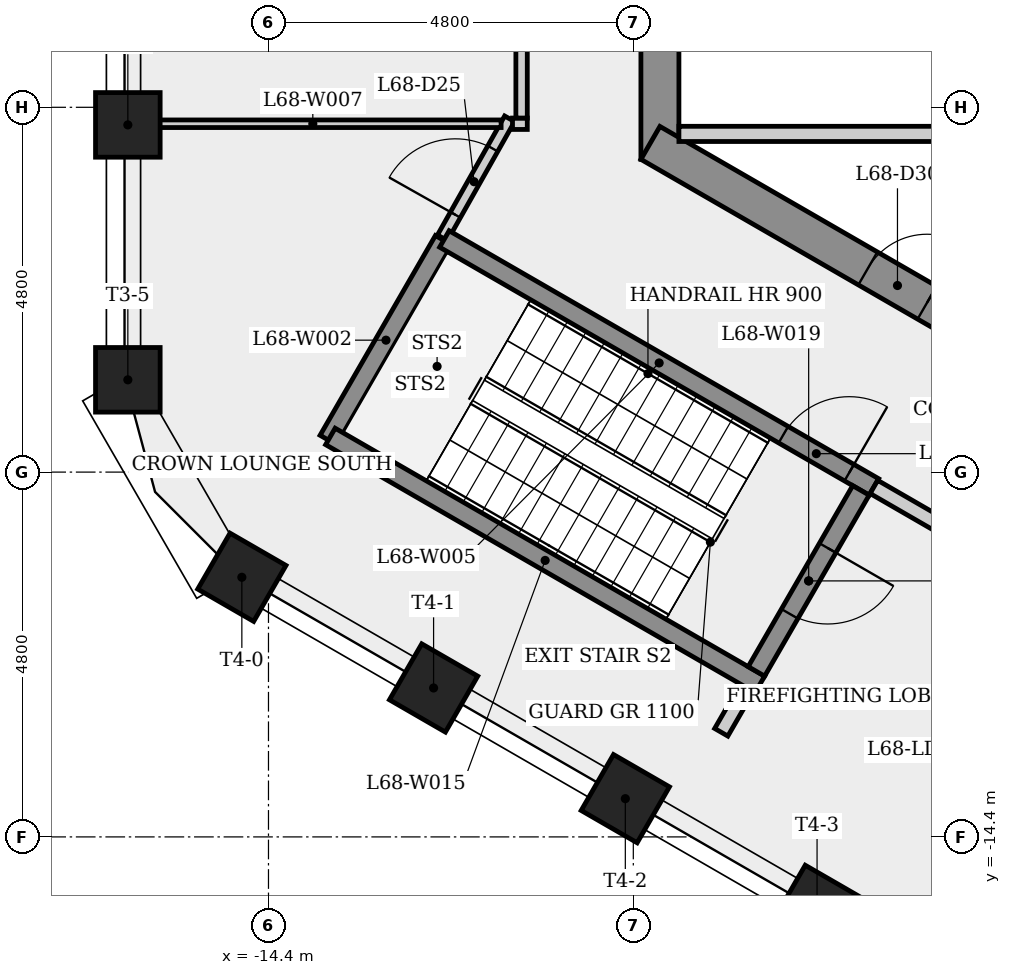
"""IFC4 building model, lengths in metres.
Left out: names, types, materials, properties, quantities, classifications, styles, units other than length and angle.
Written with IfcOpenShell. Run it as: python <this file> out.ifc"""

import sys

from ifc_helpers import new_model, si_unit, direction, frame, frame_2d, origin, origin_2d, place, context, subcontext, project, spatial, rectangle, extrude, element, fill, save


model = new_model("IFC4")
c1 = context("Model", 3, precision=1e-05, world=origin(), true_north=direction((0.0, 1.0)))
c2 = subcontext(c1, "Body", "Model", "MODEL_VIEW")
j1 = project(units=[si_unit("LENGTHUNIT", "METRE"), si_unit("PLANEANGLEUNIT", "RADIAN")], contexts=[c1])
p1 = place(None, origin())
s1 = spatial("IfcSite", under=j1, at=p1, CompositionType="ELEMENT")
p2 = place(p1, origin())
s2 = spatial("IfcBuilding", under=s1, at=p2, CompositionType="ELEMENT")
p3 = place(p2, frame((0.0, 0.0, 252.9)))
s3 = spatial("IfcBuildingStorey", under=s2, at=p3, CompositionType="ELEMENT", Elevation=252.9)
p4 = place(p3, frame((-9.25, 5.485, 0.0), z_axis=(0.0, 0.0, 1.0), x_axis=(0.0, -1.0, 0.0)))
e1 = element("IfcWall", 1, at=p4, inside=s3, PredefinedType="SHEAR", context=c2, shape_type="SweptSolid", body=[
    extrude(rectangle(XDim=10.97, YDim=0.5, at=frame_2d((5.485, 0.0))), origin(), (0.0, 0.0, 1.0), 5.0),
])
p5 = place(p4, frame((8.51, 0.0, 0.0)))
e2 = element("IfcOpeningElement", 2, at=p5, cuts=e1, PredefinedType="OPENING", context=c2, shape_type="SweptSolid", body=[
    extrude(rectangle(XDim=0.9, YDim=2.1, at=frame_2d((0.45, 1.05))), frame((0.0, 0.26, 0.0), z_axis=(0.0, -1.0, 0.0), x_axis=(1.0, 0.0, 0.0)), (0.0, 0.0, 1.0), 0.52),
])
p6 = place(p4, frame((4.685, 0.0, 0.0)))
e3 = element("IfcOpeningElement", 3, at=p6, cuts=e1, PredefinedType="OPENING", context=c2, shape_type="SweptSolid", body=[
    extrude(rectangle(XDim=1.6, YDim=2.1, at=frame_2d((0.8, 1.05))), frame((0.0, 0.26, 0.0), z_axis=(0.0, -1.0, 0.0), x_axis=(1.0, 0.0, 0.0)), (0.0, 0.0, 1.0), 0.52),
])
p7 = place(p3, frame((-9.375, -5.268, 0.0), z_axis=(0.0, 0.0, 1.0), x_axis=(0.866023993627, -0.500002442456, 0.0)))
e4 = element("IfcWall", 4, at=p7, inside=s3, PredefinedType="SHEAR", context=c2, shape_type="SweptSolid", body=[
    extrude(rectangle(XDim=10.97, YDim=0.5, at=frame_2d((5.485, 0.0))), origin(), (0.0, 0.0, 1.0), 5.0),
])
p8 = place(p7, frame((3.303, 0.0, 0.0)))
e5 = element("IfcOpeningElement", 5, at=p8, cuts=e4, PredefinedType="OPENING", context=c2, shape_type="SweptSolid", body=[
    extrude(rectangle(XDim=0.9, YDim=2.1, at=frame_2d((0.45, 1.05))), frame((0.0, 0.26, 0.0), z_axis=(0.0, -1.0, 0.0), x_axis=(1.0, 0.0, 0.0)), (0.0, 0.0, 1.0), 0.52),
])
for number, where, z_axis, x_axis in (
    (6, (-16.25, -5.031, 0.0), (0.0, 0.0, 1.0), (-1.0, 0.0, 0.0)),
    (7, (-16.25, -8.386, 0.0), (0.0, 0.0, 1.0), (-1.0, 0.0, 0.0)),
    (8, (-14.75, -10.984, 0.0), (0.0, 0.0, 1.0), (-0.5, -0.866, 0.0)),
    (9, (-12.228, -12.44, 0.0), (0.0, 0.0, 1.0), (-0.5, -0.866, 0.0)),
    (10, (-9.705, -13.897, 0.0), (0.0, 0.0, 1.0), (-0.5, -0.866, 0.0)),
    (11, (-7.182, -15.353, 0.0), (0.0, 0.0, 1.0), (-0.5, -0.866, 0.0)),
):
    element("IfcColumn", number, at=place(p3, frame(where, z_axis=z_axis, x_axis=x_axis)), inside=s3, PredefinedType="COLUMN", context=c2, shape_type="SweptSolid", body=[
        extrude(rectangle(XDim=0.85, YDim=0.85, at=origin_2d()), origin(), (0.0, 0.0, 1.0), 5.0),
    ])
p9 = place(p3, frame((-13.613, -9.178, 0.0), z_axis=(0.0, 0.0, 1.0), x_axis=(0.499954569122, 0.866051631725, 0.0)))
e12 = element("IfcWall", 12, at=p9, inside=s3, PredefinedType="SHEAR", context=c2, shape_type="SweptSolid", body=[
    extrude(rectangle(XDim=3.035, YDim=0.25, at=frame_2d((1.518, 0.0))), origin(), (0.0, 0.0, 1.0), 4.6),
])
p10 = place(p3, frame((-12.111, -6.518, 0.0), z_axis=(0.0, 0.0, 1.0), x_axis=(0.491337027479, 0.87096953186, 0.0)))
e13 = element("IfcWall", 13, at=p10, inside=s3, PredefinedType="PARTITIONING", context=c2, shape_type="SweptSolid", body=[
    extrude(rectangle(XDim=1.799, YDim=0.15, at=frame_2d((0.899, 0.0))), origin(), (0.0, 0.0, 1.0), 4.6),
])
p11 = place(p10, frame((0.348, 0.0, 0.0)))
e14 = element("IfcOpeningElement", 14, at=p11, cuts=e13, PredefinedType="OPENING", context=c2, shape_type="SweptSolid", body=[
    extrude(rectangle(XDim=1.0, YDim=2.1, at=frame_2d((0.5, 1.05))), frame((0.0, 0.085, 0.0), z_axis=(0.0, -1.0, 0.0), x_axis=(1.0, 0.0, 0.0)), (0.0, 0.0, 1.0), 0.17),
])
p12 = place(p3, frame((-12.085, -6.532, 0.0), z_axis=(0.0, 0.0, 1.0), x_axis=(0.866031063448, -0.499990197047, 0.0)))
e15 = element("IfcWall", 15, at=p12, inside=s3, PredefinedType="SHEAR", context=c2, shape_type="SweptSolid", body=[
    extrude(rectangle(XDim=6.525, YDim=0.25, at=frame_2d((3.263, 0.0))), origin(), (0.0, 0.0, 1.0), 4.6),
])
p13 = place(p12, frame((5.15, 0.0, 0.0)))
e16 = element("IfcOpeningElement", 16, at=p13, cuts=e15, PredefinedType="OPENING", context=c2, shape_type="SweptSolid", body=[
    extrude(rectangle(XDim=1.0, YDim=2.1, at=frame_2d((0.5, 1.05))), frame((0.0, 0.135, 0.0), z_axis=(0.0, -1.0, 0.0), x_axis=(1.0, 0.0, 0.0)), (0.0, 0.0, 1.0), 0.27),
])
p14 = place(p3, frame((-11.189, -5.016, 0.0), z_axis=(0.0, 0.0, 1.0), x_axis=(1.0, 0.0, 0.0)))
e17 = element("IfcWall", 17, at=p14, inside=s3, PredefinedType="PARTITIONING", context=c2, shape_type="SweptSolid", body=[
    extrude(rectangle(XDim=0.194, YDim=0.15, at=frame_2d((0.097, 0.0))), origin(), (0.0, 0.0, 1.0), 4.6),
])
p15 = place(p3, frame((-11.339, -5.016, 0.0), z_axis=(0.0, 0.0, 1.0), x_axis=(-1.0, 0.0, 0.0)))
e18 = element("IfcWall", 18, at=p15, inside=s3, PredefinedType="PARTITIONING", context=c2, shape_type="SweptSolid", body=[
    extrude(rectangle(XDim=4.955, YDim=0.1, at=frame_2d((2.477, 0.0))), origin(), (0.0, 0.0, 1.0), 4.6),
])
p16 = place(p3, frame((-11.07, -4.941, 0.0), z_axis=(0.0, 0.0, 1.0), x_axis=(0.0, 1.0, 0.0)))
e19 = element("IfcWall", 19, at=p16, inside=s3, PredefinedType="PARTITIONING", context=c2, shape_type="SweptSolid", body=[
    extrude(rectangle(XDim=9.883, YDim=0.15, at=frame_2d((4.941, 0.0))), origin(), (0.0, 0.0, 1.0), 4.6),
])
p17 = place(p16, frame((4.441, 0.0, 0.0)))
e20 = element("IfcOpeningElement", 20, at=p17, cuts=e19, PredefinedType="OPENING", context=c2, shape_type="SweptSolid", body=[
    extrude(rectangle(XDim=1.0, YDim=2.1, at=frame_2d((0.5, 1.05))), frame((0.0, 0.085, 0.0), z_axis=(0.0, -1.0, 0.0), x_axis=(1.0, 0.0, 0.0)), (0.0, 0.0, 1.0), 0.17),
])
p18 = place(p3, frame((-9.0, -5.15, 0.0), z_axis=(0.0, 0.0, 1.0), x_axis=(1.0, 0.0, 0.0)))
e21 = element("IfcWall", 21, at=p18, inside=s3, PredefinedType="PARTITIONING", context=c2, shape_type="SweptSolid", body=[
    extrude(rectangle(XDim=11.325, YDim=0.2, at=frame_2d((5.663, 0.0))), origin(), (0.0, 0.0, 1.0), 4.6),
])
p19 = place(p3, frame((-8.443, -13.023, 0.0), z_axis=(0.0, 0.0, 1.0), x_axis=(0.500066738792, 0.865986868696, 0.0)))
e22 = element("IfcWall", 22, at=p19, inside=s3, PredefinedType="PARTITIONING", context=c2, shape_type="SweptSolid", body=[
    extrude(rectangle(XDim=0.675, YDim=0.2, at=frame_2d((0.338, 0.0))), origin(), (0.0, 0.0, 1.0), 4.6),
])
p20 = place(p3, frame((-7.935, -12.393, 0.0), z_axis=(0.0, 0.0, 1.0), x_axis=(-0.866031063448, 0.499990197047, 0.0)))
e23 = element("IfcWall", 23, at=p20, inside=s3, PredefinedType="SHEAR", context=c2, shape_type="SweptSolid", body=[
    extrude(rectangle(XDim=6.525, YDim=0.25, at=frame_2d((3.263, 0.0))), origin(), (0.0, 0.0, 1.0), 4.6),
])
p21 = place(p3, frame((-6.605, -9.841, 0.0), z_axis=(0.0, 0.0, 1.0), x_axis=(-0.499996545922, -0.866027397988, 0.0)))
e24 = element("IfcWall", 24, at=p21, inside=s3, PredefinedType="SHEAR", context=c2, shape_type="SweptSolid", body=[
    extrude(rectangle(XDim=2.75, YDim=0.25, at=frame_2d((1.375, 0.0))), origin(), (0.0, 0.0, 1.0), 4.6),
])
p22 = place(p21, frame((0.875, 0.0, 0.0)))
e25 = element("IfcOpeningElement", 25, at=p22, cuts=e24, PredefinedType="OPENING", context=c2, shape_type="SweptSolid", body=[
    extrude(rectangle(XDim=1.0, YDim=2.1, at=frame_2d((0.5, 1.05))), frame((0.0, 0.135, 0.0), z_axis=(0.0, -1.0, 0.0), x_axis=(1.0, 0.0, 0.0)), (0.0, 0.0, 1.0), 0.27),
])
p23 = place(p3, frame((-6.435, -9.795, 0.0), z_axis=(0.0, 0.0, 1.0), x_axis=(0.866012907634, -0.500021643343, 0.0)))
e26 = element("IfcWall", 26, at=p23, inside=s3, PredefinedType="PARTITIONING", context=c2, shape_type="SweptSolid", body=[
    extrude(rectangle(XDim=4.45, YDim=0.2, at=frame_2d((2.225, 0.0))), origin(), (0.0, 0.0, 1.0), 4.6),
])
p24 = place(p23, frame((1.675, 0.0, 0.0)))
e27 = element("IfcOpeningElement", 27, at=p24, cuts=e26, PredefinedType="OPENING", context=c2, shape_type="SweptSolid", body=[
    extrude(rectangle(XDim=1.1, YDim=2.1, at=frame_2d((0.55, 1.05))), frame((0.0, 0.11, 0.0), z_axis=(0.0, -1.0, 0.0), x_axis=(1.0, 0.0, 0.0)), (0.0, 0.0, 1.0), 0.22),
])
p25 = place(p13, origin())
e28 = element("IfcDoor", 28, at=p25, inside=s3, OperationType="SINGLE_SWING_RIGHT", PredefinedType="DOOR", context=c2, shape_type="SweptSolid", body=[
    extrude(rectangle(XDim=1.0, YDim=2.1, at=frame_2d((0.5, 1.05))), frame((0.0, 0.025, 0.0), z_axis=(0.0, -1.0, 0.0), x_axis=(1.0, 0.0, 0.0)), (0.0, 0.0, 1.0), 0.05),
])
fill(e16, e28)
p26 = place(p22, origin())
e29 = element("IfcDoor", 29, at=p26, inside=s3, OperationType="SINGLE_SWING_LEFT", PredefinedType="DOOR", context=c2, shape_type="SweptSolid", body=[
    extrude(rectangle(XDim=1.0, YDim=2.1, at=frame_2d((0.5, 1.05))), frame((0.0, 0.025, 0.0), z_axis=(0.0, -1.0, 0.0), x_axis=(1.0, 0.0, 0.0)), (0.0, 0.0, 1.0), 0.05),
])
fill(e25, e29)
p27 = place(p11, origin())
e30 = element("IfcDoor", 30, at=p27, inside=s3, OperationType="SINGLE_SWING_LEFT", PredefinedType="DOOR", context=c2, shape_type="SweptSolid", body=[
    extrude(rectangle(XDim=1.0, YDim=2.1, at=frame_2d((0.5, 1.05))), frame((0.0, 0.025, 0.0), z_axis=(0.0, -1.0, 0.0), x_axis=(1.0, 0.0, 0.0)), (0.0, 0.0, 1.0), 0.05),
])
fill(e14, e30)
p28 = place(p8, origin())
e31 = element("IfcDoor", 31, at=p28, inside=s3, OperationType="SINGLE_SWING_RIGHT", PredefinedType="DOOR", context=c2, shape_type="SweptSolid", body=[
    extrude(rectangle(XDim=0.9, YDim=2.1, at=frame_2d((0.45, 1.05))), frame((0.0, 0.025, 0.0), z_axis=(0.0, -1.0, 0.0), x_axis=(1.0, 0.0, 0.0)), (0.0, 0.0, 1.0), 0.05),
])
fill(e5, e31)
save(model, sys.argv[1])
